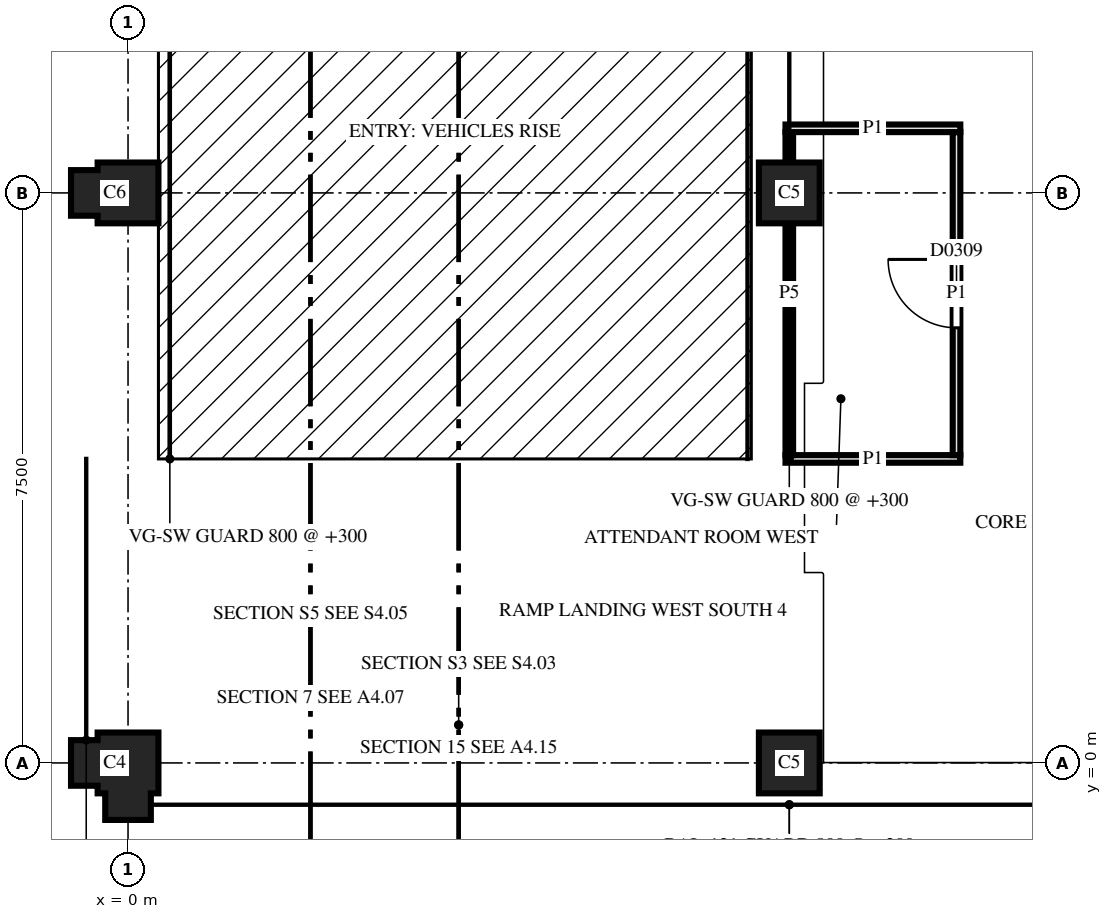
"""IFC4 building model, lengths in metres.
Left out: names, types, materials, properties, quantities, classifications, styles, units other than length and angle.
Written with IfcOpenShell. Run it as: python <this file> out.ifc"""

import sys

from ifc_helpers import new_model, si_unit, direction, frame, frame_2d, origin, place, context, subcontext, project, spatial, polyline, rectangle, outline, extrude, element, fill, save


model = new_model("IFC4")
c1 = context("Model", 3, precision=1e-05, world=origin(), true_north=direction((0.0, 1.0)))
c2 = subcontext(c1, "Body", "Model", "MODEL_VIEW")
j1 = project(units=[si_unit("LENGTHUNIT", "METRE"), si_unit("PLANEANGLEUNIT", "RADIAN")], contexts=[c1])
p1 = place(None, origin())
s1 = spatial("IfcSite", under=j1, at=p1, CompositionType="ELEMENT")
p2 = place(p1, origin())
s2 = spatial("IfcBuilding", under=s1, at=p2, CompositionType="ELEMENT")
p3 = place(p2, frame((0.0, 0.0, 11.9)))
s3 = spatial("IfcBuildingStorey", under=s2, at=p3, CompositionType="ELEMENT", Elevation=11.9)
p4 = place(p3, frame((0.0, 0.0, 0.0), z_axis=(0.0, 0.0, 1.0), x_axis=(-1.0, 0.0, 0.0)))
e1 = element("IfcColumn", 1, at=p4, inside=s3, PredefinedType="COLUMN", context=c2, shape_type="SweptSolid", body=[
    extrude(outline(polyline([(-0.4, -0.4), (0.4, -0.4), (0.4, -0.3), (0.75, -0.3), (0.75, 0.3), (0.4, 0.3), (0.4, 0.4), (0.3, 0.4), (0.3, 0.75), (-0.3, 0.75), (-0.3, 0.4), (-0.4, 0.4), (-0.4, -0.4)])), origin(), (0.0, 0.0, 1.0), 3.7),
])
p5 = place(p3, frame((8.7, 0.0, 0.0), z_axis=(0.0, 0.0, 1.0), x_axis=(1.0, 0.0, 0.0)))
e2 = element("IfcColumn", 2, at=p5, inside=s3, PredefinedType="COLUMN", context=c2, shape_type="SweptSolid", body=[
    extrude(outline(polyline([(-0.4, -0.4), (0.4, -0.4), (0.4, 0.4), (-0.4, 0.4), (-0.4, -0.4)])), origin(), (0.0, 0.0, 1.0), 3.7),
])
p6 = place(p3, frame((0.0, 7.5, 0.0), z_axis=(0.0, 0.0, 1.0), x_axis=(-1.0, 0.0, 0.0)))
e3 = element("IfcColumn", 3, at=p6, inside=s3, PredefinedType="COLUMN", context=c2, shape_type="SweptSolid", body=[
    extrude(outline(polyline([(-0.4, -0.4), (0.4, -0.4), (0.4, -0.3), (0.75, -0.3), (0.75, 0.3), (0.4, 0.3), (0.4, 0.4), (-0.4, 0.4), (-0.4, -0.4)])), origin(), (0.0, 0.0, 1.0), 3.7),
])
p7 = place(p3, frame((8.7, 7.5, 0.0), z_axis=(0.0, 0.0, 1.0), x_axis=(1.0, 0.0, 0.0)))
e4 = element("IfcColumn", 4, at=p7, inside=s3, PredefinedType="COLUMN", context=c2, shape_type="SweptSolid", body=[
    extrude(outline(polyline([(-0.4, -0.4), (0.4, -0.4), (0.4, 0.4), (-0.4, 0.4), (-0.4, -0.4)])), origin(), (0.0, 0.0, 1.0), 3.7),
])
p8 = place(p3, frame((8.65, 4.0, 0.0), z_axis=(0.0, 0.0, 1.0), x_axis=(1.0, 0.0, 0.0)))
e5 = element("IfcWall", 5, at=p8, inside=s3, PredefinedType="PARTITIONING", context=c2, shape_type="SweptSolid", body=[
    extrude(rectangle(XDim=2.3, YDim=0.1, at=frame_2d((1.15, 0.0))), origin(), (0.0, 0.0, 1.0), 2.88),
])
p9 = place(p3, frame((10.9, 4.05, 0.0), z_axis=(0.0, 0.0, 1.0), x_axis=(0.0, 1.0, 0.0)))
e6 = element("IfcWall", 6, at=p9, inside=s3, PredefinedType="PARTITIONING", context=c2, shape_type="SweptSolid", body=[
    extrude(rectangle(XDim=4.25, YDim=0.1, at=frame_2d((2.125, 0.0))), origin(), (0.0, 0.0, 1.0), 2.88),
])
p10 = place(p9, frame((1.675, 0.0, 0.0)))
e7 = element("IfcOpeningElement", 7, at=p10, cuts=e6, PredefinedType="OPENING", context=c2, shape_type="SweptSolid", body=[
    extrude(rectangle(XDim=0.9, YDim=2.1, at=frame_2d((0.45, 1.05))), frame((0.0, 0.06, 0.0), z_axis=(0.0, -1.0, 0.0), x_axis=(1.0, 0.0, 0.0)), (0.0, 0.0, 1.0), 0.12),
])
p11 = place(p3, frame((8.7, 8.3, 0.0), z_axis=(0.0, 0.0, 1.0), x_axis=(0.0, -1.0, 0.0)))
e8 = element("IfcWall", 8, at=p11, inside=s3, PredefinedType="PARTITIONING", context=c2, shape_type="SweptSolid", body=[
    extrude(rectangle(XDim=4.25, YDim=0.1, at=frame_2d((2.125, 0.0))), origin(), (0.0, 0.0, 1.0), 2.6),
])
p12 = place(p3, frame((10.95, 8.35, 0.0), z_axis=(0.0, 0.0, 1.0), x_axis=(-1.0, 0.0, 0.0)))
e9 = element("IfcWall", 9, at=p12, inside=s3, PredefinedType="PARTITIONING", context=c2, shape_type="SweptSolid", body=[
    extrude(rectangle(XDim=2.3, YDim=0.1, at=frame_2d((1.15, 0.0))), origin(), (0.0, 0.0, 1.0), 2.88),
])
p13 = place(p10, origin())
e10 = element("IfcDoor", 10, at=p13, inside=s3, OperationType="SINGLE_SWING_LEFT", PredefinedType="DOOR", context=c2, shape_type="SweptSolid", body=[
    extrude(rectangle(XDim=0.9, YDim=2.1, at=frame_2d((0.45, 1.05))), frame((0.0, 0.025, 0.0), z_axis=(0.0, -1.0, 0.0), x_axis=(1.0, 0.0, 0.0)), (0.0, 0.0, 1.0), 0.05),
])
fill(e7, e10)
save(model, sys.argv[1])
